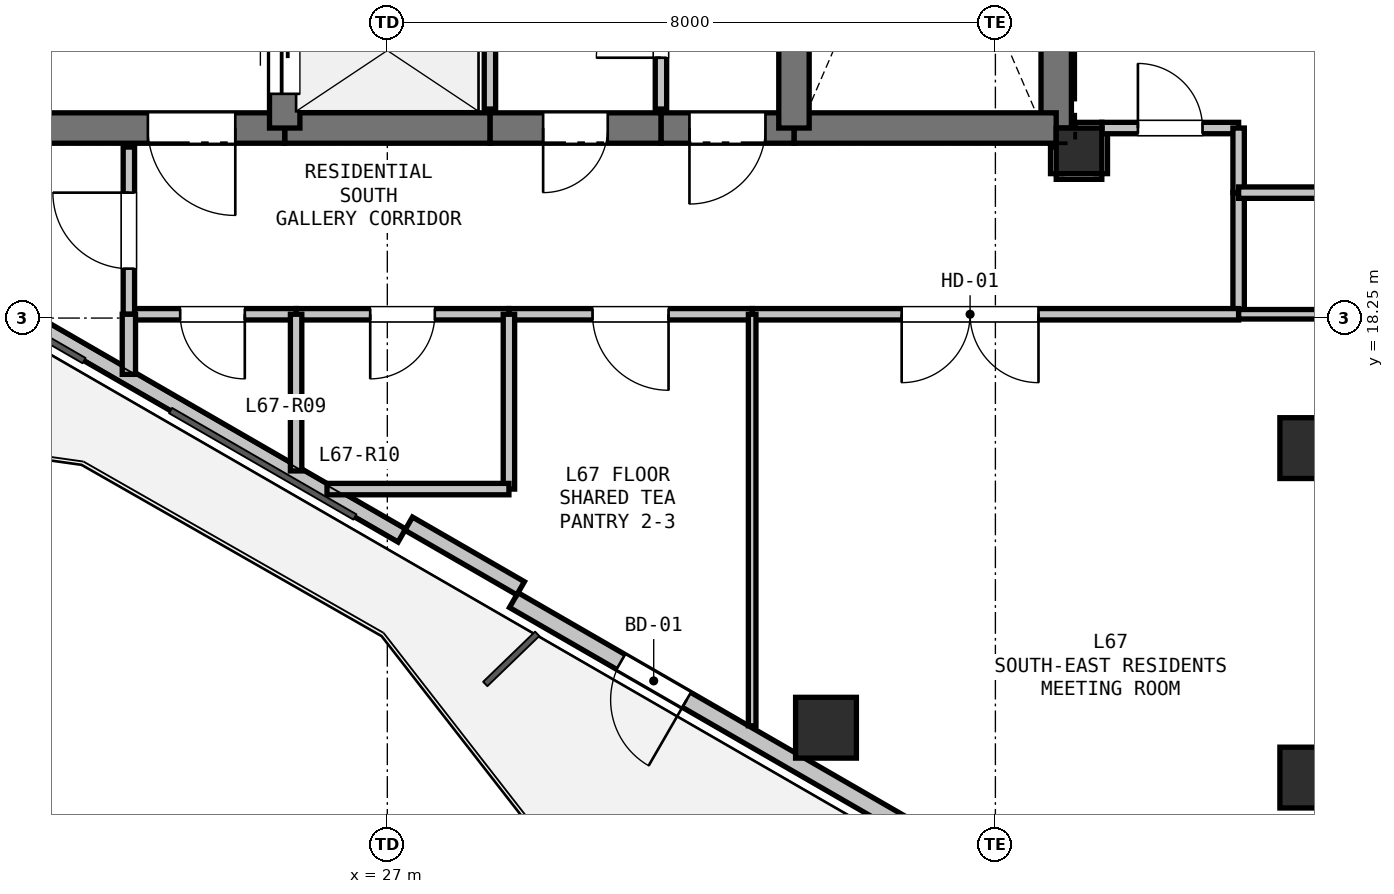
"""IFC4 building model, lengths in metres.
Left out: names, types, materials, properties, quantities, classifications, styles, units other than length and angle.
Written with IfcOpenShell. Run it as: python <this file> out.ifc"""

import sys

from ifc_helpers import new_model, si_unit, direction, frame, frame_2d, origin, origin_2d, place, context, subcontext, project, spatial, rectangle, hollow_rectangle, extrude, element, fill, save


model = new_model("IFC4")
c1 = context("Model", 3, precision=1e-05, world=origin(), true_north=direction((0.0, 1.0)))
c2 = subcontext(c1, "Body", "Model", "MODEL_VIEW")
j1 = project(units=[si_unit("LENGTHUNIT", "METRE"), si_unit("PLANEANGLEUNIT", "RADIAN")], contexts=[c1])
p1 = place(None, origin())
s1 = spatial("IfcSite", under=j1, at=p1, CompositionType="ELEMENT")
p2 = place(p1, origin())
s2 = spatial("IfcBuilding", under=s1, at=p2, CompositionType="ELEMENT")
p3 = place(p2, frame((0.0, 0.0, 239.7)))
s3 = spatial("IfcBuildingStorey", under=s2, at=p3, CompositionType="ELEMENT", Elevation=239.7)
p4 = place(p3, frame((36.1, 20.45, 0.0), z_axis=(0.0, 0.0, 1.0), x_axis=(1.0, 0.0, 0.0)))
e1 = element("IfcColumn", 1, at=p4, inside=s3, PredefinedType="COLUMN", context=c2, shape_type="SweptSolid", body=[
    extrude(rectangle(XDim=0.6, YDim=0.6, at=origin_2d()), origin(), (0.0, 0.0, 1.0), 3.3),
])
for number, where, z_axis, x_axis in (
    (2, (39.143, 16.539, 0.0), (0.0, 0.0, 1.0), (1.0, 0.0, 0.0)),
    (3, (39.143, 12.205, 0.0), (0.0, 0.0, 1.0), (1.0, 0.0, 0.0)),
    (4, (32.771, 12.861, 0.0), (0.0, 0.0, 1.0), (1.0, 0.0, 0.0)),
):
    element("IfcColumn", number, at=place(p3, frame(where, z_axis=z_axis, x_axis=x_axis)), inside=s3, PredefinedType="COLUMN", context=c2, shape_type="SweptSolid", body=[
        extrude(hollow_rectangle(XDim=0.8, YDim=0.8, WallThickness=0.025, at=origin_2d()), origin(), (0.0, 0.0, 1.0), 3.3),
    ])
p5 = place(p3, frame((39.743, 11.858, 0.0), z_axis=(0.0, 0.0, 1.0), x_axis=(-0.866038962515, -0.499976514854, 0.0)))
e5 = element("IfcWall", 5, at=p5, inside=s3, PredefinedType="SOLIDWALL", context=c2, shape_type="SweptSolid", body=[
    extrude(rectangle(XDim=3.716, YDim=0.225, at=frame_2d((1.858, 0.0))), origin(), (0.0, 0.0, 1.0), 2.7),
])
p6 = place(p3, frame((36.395, 10.076, 0.0), z_axis=(0.0, 0.0, 1.0), x_axis=(-0.866026655105, 0.499997832642, 0.0)))
e6 = element("IfcWall", 6, at=p6, inside=s3, PredefinedType="SOLIDWALL", context=c2, shape_type="SweptSolid", body=[
    extrude(rectangle(XDim=8.928, YDim=0.225, at=frame_2d((4.464, 0.0))), origin(), (0.0, 0.0, 1.0), 2.7),
])
p7 = place(p6, frame((6.302, 0.0, 0.0)))
e7 = element("IfcOpeningElement", 7, at=p7, cuts=e6, PredefinedType="OPENING", context=c2, shape_type="SweptSolid", body=[
    extrude(rectangle(XDim=1.0, YDim=2.1, at=frame_2d((0.5, 1.05))), frame((0.0, 0.123, 0.0), z_axis=(0.0, -1.0, 0.0), x_axis=(1.0, 0.0, 0.0)), (0.0, 0.0, 1.0), 0.245),
])
p8 = place(p3, frame((27.191, 15.389, 0.0), z_axis=(0.0, 0.0, 1.0), x_axis=(-0.866019557082, 0.500010126649, 0.0)))
e8 = element("IfcWall", 8, at=p8, inside=s3, PredefinedType="PARAPET", context=c2, shape_type="SweptSolid", body=[
    extrude(rectangle(XDim=8.228, YDim=0.2, at=frame_2d((4.114, 0.0))), origin(), (0.0, 0.0, 1.0), 0.2),
])
p9 = place(p3, frame((28.754, 14.695, 0.0), z_axis=(0.0, 0.0, 1.0), x_axis=(-0.866025371046, 0.500000056704, 0.0)))
e9 = element("IfcWall", 9, at=p9, inside=s3, PredefinedType="PARAPET", context=c2, shape_type="SweptSolid", body=[
    extrude(rectangle(XDim=1.7, YDim=0.2, at=frame_2d((0.85, 0.0))), origin(), (0.0, 0.0, 1.0), 2.7),
])
p10 = place(p3, frame((35.8, 28.1, 0.0), z_axis=(0.0, 0.0, 1.0), x_axis=(0.0, -1.0, 0.0)))
e10 = element("IfcWall", 10, at=p10, inside=s3, PredefinedType="SHEAR", context=c2, shape_type="SweptSolid", body=[
    extrude(rectangle(XDim=7.35, YDim=0.4, at=frame_2d((3.675, 0.0))), origin(), (0.0, 0.0, 1.0), 3.08),
])
p11 = place(p3, frame((35.8, 20.75, 0.0), z_axis=(0.0, 0.0, 1.0), x_axis=(-1.0, 0.0, 0.0)))
e11 = element("IfcWall", 11, at=p11, inside=s3, PredefinedType="SHEAR", context=c2, shape_type="SweptSolid", body=[
    extrude(rectangle(XDim=3.45, YDim=0.4, at=frame_2d((1.725, 0.0))), origin(), (0.0, 0.0, 1.0), 3.08),
])
p12 = place(p3, frame((32.35, 20.75, 0.0), z_axis=(0.0, 0.0, 1.0), x_axis=(-1.0, 0.0, 0.0)))
e12 = element("IfcWall", 12, at=p12, inside=s3, PredefinedType="SHEAR", context=c2, shape_type="SweptSolid", body=[
    extrude(rectangle(XDim=1.75, YDim=0.4, at=frame_2d((0.875, 0.0))), origin(), (0.0, 0.0, 1.0), 3.08),
])
p13 = place(p12, frame((0.375, 0.0, 0.0)))
e13 = element("IfcOpeningElement", 13, at=p13, cuts=e12, PredefinedType="OPENING", context=c2, shape_type="SweptSolid", body=[
    extrude(rectangle(XDim=1.0, YDim=2.15, at=frame_2d((0.5, 1.075))), frame((0.0, 0.21, 0.0), z_axis=(0.0, -1.0, 0.0), x_axis=(1.0, 0.0, 0.0)), (0.0, 0.0, 1.0), 0.42),
])
p14 = place(p3, frame((30.6, 20.75, 0.0), z_axis=(0.0, 0.0, 1.0), x_axis=(-1.0, 0.0, 0.0)))
e14 = element("IfcWall", 14, at=p14, inside=s3, PredefinedType="SHEAR", context=c2, shape_type="SweptSolid", body=[
    extrude(rectangle(XDim=2.25, YDim=0.4, at=frame_2d((1.125, 0.0))), origin(), (0.0, 0.0, 1.0), 3.08),
])
p15 = place(p14, frame((0.7, 0.0, 0.0)))
e15 = element("IfcOpeningElement", 15, at=p15, cuts=e14, PredefinedType="OPENING", context=c2, shape_type="SweptSolid", body=[
    extrude(rectangle(XDim=0.85, YDim=2.1, at=frame_2d((0.425, 1.05))), frame((0.0, 0.21, 0.0), z_axis=(0.0, -1.0, 0.0), x_axis=(1.0, 0.0, 0.0)), (0.0, 0.0, 1.0), 0.42),
])
p16 = place(p3, frame((28.35, 20.75, 0.0), z_axis=(0.0, 0.0, 1.0), x_axis=(-1.0, 0.0, 0.0)))
e16 = element("IfcWall", 16, at=p16, inside=s3, PredefinedType="SHEAR", context=c2, shape_type="SweptSolid", body=[
    extrude(rectangle(XDim=2.7, YDim=0.4, at=frame_2d((1.35, 0.0))), origin(), (0.0, 0.0, 1.0), 3.08),
])
p17 = place(p3, frame((25.65, 20.75, 0.0), z_axis=(0.0, 0.0, 1.0), x_axis=(-1.0, 0.0, 0.0)))
e17 = element("IfcWall", 17, at=p17, inside=s3, PredefinedType="SHEAR", context=c2, shape_type="SweptSolid", body=[
    extrude(rectangle(XDim=3.45, YDim=0.4, at=frame_2d((1.725, 0.0))), origin(), (0.0, 0.0, 1.0), 3.08),
])
p18 = place(p17, frame((0.65, 0.0, 0.0)))
e18 = element("IfcOpeningElement", 18, at=p18, cuts=e17, PredefinedType="OPENING", context=c2, shape_type="SweptSolid", body=[
    extrude(rectangle(XDim=1.15, YDim=2.15, at=frame_2d((0.575, 1.075))), frame((0.0, 0.21, 0.0), z_axis=(0.0, -1.0, 0.0), x_axis=(1.0, 0.0, 0.0)), (0.0, 0.0, 1.0), 0.42),
])
p19 = place(p3, frame((25.65, 20.75, 0.0), z_axis=(0.0, 0.0, 1.0), x_axis=(0.0, 1.0, 0.0)))
e19 = element("IfcWall", 19, at=p19, inside=s3, PredefinedType="SHEAR", context=c2, shape_type="SweptSolid", body=[
    extrude(rectangle(XDim=2.0, YDim=0.4, at=frame_2d((1.0, 0.0))), origin(), (0.0, 0.0, 1.0), 3.08),
])
p20 = place(p19, frame((0.45, 0.0, 0.0)))
e20 = element("IfcOpeningElement", 20, at=p20, cuts=e19, PredefinedType="OPENING", context=c2, shape_type="SweptSolid", body=[
    extrude(rectangle(XDim=1.1, YDim=2.15, at=frame_2d((0.55, 1.075))), frame((0.0, 0.21, 0.0), z_axis=(0.0, -1.0, 0.0), x_axis=(1.0, 0.0, 0.0)), (0.0, 0.0, 1.0), 0.42),
])
p21 = place(p3, frame((32.35, 20.75, 0.0), z_axis=(0.0, 0.0, 1.0), x_axis=(0.0, 1.0, 0.0)))
e21 = element("IfcWall", 21, at=p21, inside=s3, PredefinedType="SHEAR", context=c2, shape_type="SweptSolid", body=[
    extrude(rectangle(XDim=4.8, YDim=0.4, at=frame_2d((2.4, 0.0))), origin(), (0.0, 0.0, 1.0), 3.08),
])
p22 = place(p3, frame((28.35, 23.2, 0.0), z_axis=(0.0, 0.0, 1.0), x_axis=(0.0, -1.0, 0.0)))
e22 = element("IfcWall", 22, at=p22, inside=s3, PredefinedType="PARTITIONING", context=c2, shape_type="SweptSolid", body=[
    extrude(rectangle(XDim=2.2, YDim=0.15, at=frame_2d((1.1, 0.0))), origin(), (0.0, 0.0, 1.0), 3.08),
])
p23 = place(p3, frame((30.6, 21.0, 0.0), z_axis=(0.0, 0.0, 1.0), x_axis=(0.0, 1.0, 0.0)))
e23 = element("IfcWall", 23, at=p23, inside=s3, PredefinedType="PARTITIONING", context=c2, shape_type="SweptSolid", body=[
    extrude(rectangle(XDim=2.2, YDim=0.15, at=frame_2d((1.1, 0.0))), origin(), (0.0, 0.0, 1.0), 3.08),
])
p24 = place(p23, frame((0.675, 0.0, 0.0)))
e24 = element("IfcOpeningElement", 24, at=p24, cuts=e23, PredefinedType="OPENING", context=c2, shape_type="SweptSolid", body=[
    extrude(rectangle(XDim=0.85, YDim=2.1, at=frame_2d((0.425, 1.05))), frame((0.0, 0.085, 0.0), z_axis=(0.0, -1.0, 0.0), x_axis=(1.0, 0.0, 0.0)), (0.0, 0.0, 1.0), 0.17),
])
p25 = place(p3, frame((35.8, 20.15, 0.0), z_axis=(0.0, 0.0, 1.0), x_axis=(1.0, 0.0, 0.0)))
e25 = element("IfcWall", 25, at=p25, inside=s3, PredefinedType="PARTITIONING", context=c2, shape_type="SweptSolid", body=[
    extrude(rectangle(XDim=0.6, YDim=0.15, at=frame_2d((0.3, 0.0))), origin(), (0.0, 0.0, 1.0), 2.528),
])
p26 = place(p3, frame((36.4, 20.15, 0.0), z_axis=(0.0, 0.0, 1.0), x_axis=(0.0, 1.0, 0.0)))
e26 = element("IfcWall", 26, at=p26, inside=s3, PredefinedType="PARTITIONING", context=c2, shape_type="SweptSolid", body=[
    extrude(rectangle(XDim=0.6, YDim=0.15, at=frame_2d((0.3, 0.0))), origin(), (0.0, 0.0, 1.0), 3.08),
])
p27 = place(p3, frame((36.4, 20.75, 0.0), z_axis=(0.0, 0.0, 1.0), x_axis=(1.0, 0.0, 0.0)))
e27 = element("IfcWall", 27, at=p27, inside=s3, PredefinedType="PARTITIONING", context=c2, shape_type="SweptSolid", body=[
    extrude(rectangle(XDim=1.8, YDim=0.15, at=frame_2d((0.9, 0.0))), origin(), (0.0, 0.0, 1.0), 3.08),
])
p28 = place(p27, frame((0.475, 0.0, 0.0)))
e28 = element("IfcOpeningElement", 28, at=p28, cuts=e27, PredefinedType="OPENING", context=c2, shape_type="SweptSolid", body=[
    extrude(rectangle(XDim=0.85, YDim=2.1, at=frame_2d((0.425, 1.05))), frame((0.0, 0.085, 0.0), z_axis=(0.0, -1.0, 0.0), x_axis=(1.0, 0.0, 0.0)), (0.0, 0.0, 1.0), 0.17),
])
p29 = place(p3, frame((38.2, 20.75, 0.0), z_axis=(0.0, 0.0, 1.0), x_axis=(0.0, -1.0, 0.0)))
e29 = element("IfcWall", 29, at=p29, inside=s3, PredefinedType="PARTITIONING", context=c2, shape_type="SweptSolid", body=[
    extrude(rectangle(XDim=0.85, YDim=0.15, at=frame_2d((0.425, 0.0))), origin(), (0.0, 0.0, 1.0), 3.08),
])
p30 = place(p3, frame((38.2, 19.9, 0.0), z_axis=(0.0, 0.0, 1.0), x_axis=(0.0, -1.0, 0.0)))
e30 = element("IfcWall", 30, at=p30, inside=s3, PredefinedType="PARTITIONING", context=c2, shape_type="SweptSolid", body=[
    extrude(rectangle(XDim=1.6, YDim=0.15, at=frame_2d((0.8, 0.0))), origin(), (0.0, 0.0, 1.0), 3.08),
])
p31 = place(p3, frame((38.2, 18.3, 0.0), z_axis=(0.0, 0.0, 1.0), x_axis=(-1.0, 0.0, 0.0)))
e31 = element("IfcWall", 31, at=p31, inside=s3, PredefinedType="PARTITIONING", context=c2, shape_type="SweptSolid", body=[
    extrude(rectangle(XDim=6.4, YDim=0.15, at=frame_2d((3.2, 0.0))), origin(), (0.0, 0.0, 1.0), 2.528),
])
p32 = place(p31, frame((2.633, 0.0, 0.0)))
e32 = element("IfcOpeningElement", 32, at=p32, cuts=e31, PredefinedType="OPENING", context=c2, shape_type="SweptSolid", body=[
    extrude(rectangle(XDim=1.8, YDim=2.2, at=frame_2d((0.9, 1.1))), frame((0.0, 0.085, 0.0), z_axis=(0.0, -1.0, 0.0), x_axis=(1.0, 0.0, 0.0)), (0.0, 0.0, 1.0), 0.17),
])
p33 = place(p3, frame((31.8, 18.3, 0.0), z_axis=(0.0, 0.0, 1.0), x_axis=(-1.0, 0.0, 0.0)))
e33 = element("IfcWall", 33, at=p33, inside=s3, PredefinedType="PARTITIONING", context=c2, shape_type="SweptSolid", body=[
    extrude(rectangle(XDim=3.2, YDim=0.15, at=frame_2d((1.6, 0.0))), origin(), (0.0, 0.0, 1.0), 3.08),
])
p34 = place(p33, frame((1.1, 0.0, 0.0)))
e34 = element("IfcOpeningElement", 34, at=p34, cuts=e33, PredefinedType="OPENING", context=c2, shape_type="SweptSolid", body=[
    extrude(rectangle(XDim=1.0, YDim=2.15, at=frame_2d((0.5, 1.075))), frame((0.0, 0.085, 0.0), z_axis=(0.0, -1.0, 0.0), x_axis=(1.0, 0.0, 0.0)), (0.0, 0.0, 1.0), 0.17),
])
p35 = place(p3, frame((28.6, 18.3, 0.0), z_axis=(0.0, 0.0, 1.0), x_axis=(-1.0, 0.0, 0.0)))
e35 = element("IfcWall", 35, at=p35, inside=s3, PredefinedType="PARTITIONING", context=c2, shape_type="SweptSolid", body=[
    extrude(rectangle(XDim=2.8, YDim=0.15, at=frame_2d((1.4, 0.0))), origin(), (0.0, 0.0, 1.0), 3.08),
])
p36 = place(p35, frame((0.975, 0.0, 0.0)))
e36 = element("IfcOpeningElement", 36, at=p36, cuts=e35, PredefinedType="OPENING", context=c2, shape_type="SweptSolid", body=[
    extrude(rectangle(XDim=0.85, YDim=2.1, at=frame_2d((0.425, 1.05))), frame((0.0, 0.085, 0.0), z_axis=(0.0, -1.0, 0.0), x_axis=(1.0, 0.0, 0.0)), (0.0, 0.0, 1.0), 0.17),
])
p37 = place(p3, frame((25.8, 18.3, 0.0), z_axis=(0.0, 0.0, 1.0), x_axis=(-1.0, 0.0, 0.0)))
e37 = element("IfcWall", 37, at=p37, inside=s3, PredefinedType="PARTITIONING", context=c2, shape_type="SweptSolid", body=[
    extrude(rectangle(XDim=2.2, YDim=0.15, at=frame_2d((1.1, 0.0))), origin(), (0.0, 0.0, 1.0), 2.365),
])
p38 = place(p37, frame((0.675, 0.0, 0.0)))
e38 = element("IfcOpeningElement", 38, at=p38, cuts=e37, PredefinedType="OPENING", context=c2, shape_type="SweptSolid", body=[
    extrude(rectangle(XDim=0.85, YDim=2.1, at=frame_2d((0.425, 1.05))), frame((0.0, 0.085, 0.0), z_axis=(0.0, -1.0, 0.0), x_axis=(1.0, 0.0, 0.0)), (0.0, 0.0, 1.0), 0.17),
])
p39 = place(p3, frame((23.6, 18.3, 0.0), z_axis=(0.0, 0.0, 1.0), x_axis=(0.0, 1.0, 0.0)))
e39 = element("IfcWall", 39, at=p39, inside=s3, PredefinedType="PARTITIONING", context=c2, shape_type="SweptSolid", body=[
    extrude(rectangle(XDim=2.2, YDim=0.15, at=frame_2d((1.1, 0.0))), origin(), (0.0, 0.0, 1.0), 2.528),
])
p40 = place(p39, frame((0.6, 0.0, 0.0)))
e40 = element("IfcOpeningElement", 40, at=p40, cuts=e39, PredefinedType="OPENING", context=c2, shape_type="SweptSolid", body=[
    extrude(rectangle(XDim=1.0, YDim=2.15, at=frame_2d((0.5, 1.075))), frame((0.0, 0.085, 0.0), z_axis=(0.0, -1.0, 0.0), x_axis=(1.0, 0.0, 0.0)), (0.0, 0.0, 1.0), 0.17),
])
p41 = place(p3, frame((35.8, 20.5, 0.0), z_axis=(0.0, 0.0, 1.0), x_axis=(0.0, -1.0, 0.0)))
e41 = element("IfcWall", 41, at=p41, inside=s3, PredefinedType="PARTITIONING", context=c2, shape_type="SweptSolid", body=[
    extrude(rectangle(XDim=0.35, YDim=0.15, at=frame_2d((0.175, 0.0))), origin(), (0.0, 0.0, 1.0), 2.605),
])
p42 = place(p3, frame((25.8, 18.3, 0.0), z_axis=(0.0, 0.0, 1.0), x_axis=(0.0, -1.0, 0.0)))
e42 = element("IfcWall", 42, at=p42, inside=s3, PredefinedType="PARTITIONING", context=c2, shape_type="SweptSolid", body=[
    extrude(rectangle(XDim=2.061, YDim=0.15, at=frame_2d((1.031, 0.0))), origin(), (0.0, 0.0, 1.0), 2.365),
])
p43 = place(p3, frame((23.6, 17.509, 0.0), z_axis=(0.0, 0.0, 1.0), x_axis=(0.0, 1.0, 0.0)))
e43 = element("IfcWall", 43, at=p43, inside=s3, PredefinedType="PLUMBINGWALL", context=c2, shape_type="SweptSolid", body=[
    extrude(rectangle(XDim=0.791, YDim=0.175, at=frame_2d((0.396, 0.0))), origin(), (0.0, 0.0, 1.0), 2.365),
])
p44 = place(p3, frame((31.8, 12.886, 0.0), z_axis=(0.0, 0.0, 1.0), x_axis=(0.0, 1.0, 0.0)))
e44 = element("IfcWall", 44, at=p44, inside=s3, PredefinedType="PARTITIONING", context=c2, shape_type="SweptSolid", body=[
    extrude(rectangle(XDim=5.414, YDim=0.1, at=frame_2d((2.707, 0.0))), origin(), (0.0, 0.0, 1.0), 2.365),
])
p45 = place(p3, frame((38.2, 18.3, 0.0), z_axis=(0.0, 0.0, 1.0), x_axis=(1.0, 0.0, 0.0)))
e45 = element("IfcWall", 45, at=p45, inside=s3, PredefinedType="PARTITIONING", context=c2, shape_type="SweptSolid", body=[
    extrude(rectangle(XDim=1.406, YDim=0.125, at=frame_2d((0.703, 0.0))), origin(), (0.0, 0.0, 1.0), 2.365),
])
p46 = place(p3, frame((36.4, 20.75, 0.0), z_axis=(0.0, 0.0, 1.0), x_axis=(-1.0, 0.0, 0.0)))
e46 = element("IfcWall", 46, at=p46, inside=s3, PredefinedType="PARTITIONING", context=c2, shape_type="SweptSolid", body=[
    extrude(rectangle(XDim=0.35, YDim=0.15, at=frame_2d((0.175, 0.0))), origin(), (0.0, 0.0, 1.0), 2.605),
])
p47 = place(p3, frame((39.606, 19.9, 0.0), z_axis=(0.0, 0.0, 1.0), x_axis=(-1.0, 0.0, 0.0)))
e47 = element("IfcWall", 47, at=p47, inside=s3, PredefinedType="PARTITIONING", context=c2, shape_type="SweptSolid", body=[
    extrude(rectangle(XDim=1.406, YDim=0.15, at=frame_2d((0.703, 0.0))), origin(), (0.0, 0.0, 1.0), 2.365),
])
p48 = place(p3, frame((28.6, 18.3, 0.0), z_axis=(0.0, 0.0, 1.0), x_axis=(0.0, -1.0, 0.0)))
e48 = element("IfcWall", 48, at=p48, inside=s3, PredefinedType="PARTITIONING", context=c2, shape_type="SweptSolid", body=[
    extrude(rectangle(XDim=2.3, YDim=0.15, at=frame_2d((1.15, 0.0))), origin(), (0.0, 0.0, 1.0), 3.08),
])
p49 = place(p3, frame((28.6, 16.0, 0.0), z_axis=(0.0, 0.0, 1.0), x_axis=(-1.0, 0.0, 0.0)))
e49 = element("IfcWall", 49, at=p49, inside=s3, PredefinedType="PARTITIONING", context=c2, shape_type="SweptSolid", body=[
    extrude(rectangle(XDim=2.394, YDim=0.15, at=frame_2d((1.197, 0.0))), origin(), (0.0, 0.0, 1.0), 2.365),
])
p50 = place(p7, origin())
e50 = element("IfcDoor", 50, at=p50, inside=s3, OperationType="SINGLE_SWING_LEFT", PredefinedType="DOOR", context=c2, shape_type="SweptSolid", body=[
    extrude(rectangle(XDim=1.0, YDim=2.1, at=frame_2d((0.5, 1.05))), frame((0.0, 0.025, 0.0), z_axis=(0.0, -1.0, 0.0), x_axis=(1.0, 0.0, 0.0)), (0.0, 0.0, 1.0), 0.05),
])
fill(e7, e50)
p51 = place(p13, origin())
e51 = element("IfcDoor", 51, at=p51, inside=s3, OperationType="SINGLE_SWING_RIGHT", PredefinedType="DOOR", context=c2, shape_type="SweptSolid", body=[
    extrude(rectangle(XDim=1.0, YDim=2.15, at=frame_2d((0.5, 1.075))), frame((0.0, 0.025, 0.0), z_axis=(0.0, -1.0, 0.0), x_axis=(1.0, 0.0, 0.0)), (0.0, 0.0, 1.0), 0.05),
])
fill(e13, e51)
p52 = place(p20, origin())
e52 = element("IfcDoor", 52, at=p52, inside=s3, OperationType="SLIDING_TO_LEFT", PredefinedType="DOOR", context=c2, shape_type="SweptSolid", body=[
    extrude(rectangle(XDim=1.1, YDim=2.15, at=frame_2d((0.55, 1.075))), frame((0.0, 0.025, 0.0), z_axis=(0.0, -1.0, 0.0), x_axis=(1.0, 0.0, 0.0)), (0.0, 0.0, 1.0), 0.05),
])
fill(e20, e52)
p53 = place(p18, origin())
e53 = element("IfcDoor", 53, at=p53, inside=s3, OperationType="SINGLE_SWING_LEFT", PredefinedType="DOOR", context=c2, shape_type="SweptSolid", body=[
    extrude(rectangle(XDim=1.15, YDim=2.15, at=frame_2d((0.575, 1.075))), frame((0.0, 0.025, 0.0), z_axis=(0.0, -1.0, 0.0), x_axis=(1.0, 0.0, 0.0)), (0.0, 0.0, 1.0), 0.05),
])
fill(e18, e53)
p54 = place(p24, origin())
e54 = element("IfcDoor", 54, at=p54, inside=s3, OperationType="SINGLE_SWING_LEFT", PredefinedType="DOOR", context=c2, shape_type="SweptSolid", body=[
    extrude(rectangle(XDim=0.85, YDim=2.1, at=frame_2d((0.425, 1.05))), frame((0.0, 0.025, 0.0), z_axis=(0.0, -1.0, 0.0), x_axis=(1.0, 0.0, 0.0)), (0.0, 0.0, 1.0), 0.05),
])
fill(e24, e54)
p55 = place(p38, origin())
e55 = element("IfcDoor", 55, at=p55, inside=s3, OperationType="SINGLE_SWING_LEFT", PredefinedType="DOOR", context=c2, shape_type="SweptSolid", body=[
    extrude(rectangle(XDim=0.85, YDim=2.1, at=frame_2d((0.425, 1.05))), frame((0.0, 0.025, 0.0), z_axis=(0.0, -1.0, 0.0), x_axis=(1.0, 0.0, 0.0)), (0.0, 0.0, 1.0), 0.05),
])
fill(e38, e55)
p56 = place(p15, origin())
e56 = element("IfcDoor", 56, at=p56, inside=s3, OperationType="SINGLE_SWING_RIGHT", PredefinedType="DOOR", context=c2, shape_type="SweptSolid", body=[
    extrude(rectangle(XDim=0.85, YDim=2.1, at=frame_2d((0.425, 1.05))), frame((0.0, 0.025, 0.0), z_axis=(0.0, -1.0, 0.0), x_axis=(1.0, 0.0, 0.0)), (0.0, 0.0, 1.0), 0.05),
])
fill(e15, e56)
p57 = place(p32, origin())
e57 = element("IfcDoor", 57, at=p57, inside=s3, OperationType="DOUBLE_DOOR_SINGLE_SWING", PredefinedType="DOOR", context=c2, shape_type="SweptSolid", body=[
    extrude(rectangle(XDim=1.8, YDim=2.2, at=frame_2d((0.9, 1.1))), frame((0.0, 0.025, 0.0), z_axis=(0.0, -1.0, 0.0), x_axis=(1.0, 0.0, 0.0)), (0.0, 0.0, 1.0), 0.05),
])
fill(e32, e57)
p58 = place(p40, origin())
e58 = element("IfcDoor", 58, at=p58, inside=s3, OperationType="SINGLE_SWING_RIGHT", PredefinedType="DOOR", context=c2, shape_type="SweptSolid", body=[
    extrude(rectangle(XDim=1.0, YDim=2.15, at=frame_2d((0.5, 1.075))), frame((0.0, 0.025, 0.0), z_axis=(0.0, -1.0, 0.0), x_axis=(1.0, 0.0, 0.0)), (0.0, 0.0, 1.0), 0.05),
])
fill(e40, e58)
p59 = place(p28, origin())
e59 = element("IfcDoor", 59, at=p59, inside=s3, OperationType="SINGLE_SWING_LEFT", PredefinedType="DOOR", context=c2, shape_type="SweptSolid", body=[
    extrude(rectangle(XDim=0.85, YDim=2.1, at=frame_2d((0.425, 1.05))), frame((0.0, 0.025, 0.0), z_axis=(0.0, -1.0, 0.0), x_axis=(1.0, 0.0, 0.0)), (0.0, 0.0, 1.0), 0.05),
])
fill(e28, e59)
p60 = place(p36, origin())
e60 = element("IfcDoor", 60, at=p60, inside=s3, OperationType="SINGLE_SWING_RIGHT", PredefinedType="DOOR", context=c2, shape_type="SweptSolid", body=[
    extrude(rectangle(XDim=0.85, YDim=2.1, at=frame_2d((0.425, 1.05))), frame((0.0, 0.025, 0.0), z_axis=(0.0, -1.0, 0.0), x_axis=(1.0, 0.0, 0.0)), (0.0, 0.0, 1.0), 0.05),
])
fill(e36, e60)
p61 = place(p34, origin())
e61 = element("IfcDoor", 61, at=p61, inside=s3, OperationType="SINGLE_SWING_LEFT", PredefinedType="DOOR", context=c2, shape_type="SweptSolid", body=[
    extrude(rectangle(XDim=1.0, YDim=2.15, at=frame_2d((0.5, 1.075))), frame((0.0, 0.025, 0.0), z_axis=(0.0, -1.0, 0.0), x_axis=(1.0, 0.0, 0.0)), (0.0, 0.0, 1.0), 0.05),
])
fill(e34, e61)
save(model, sys.argv[1])
